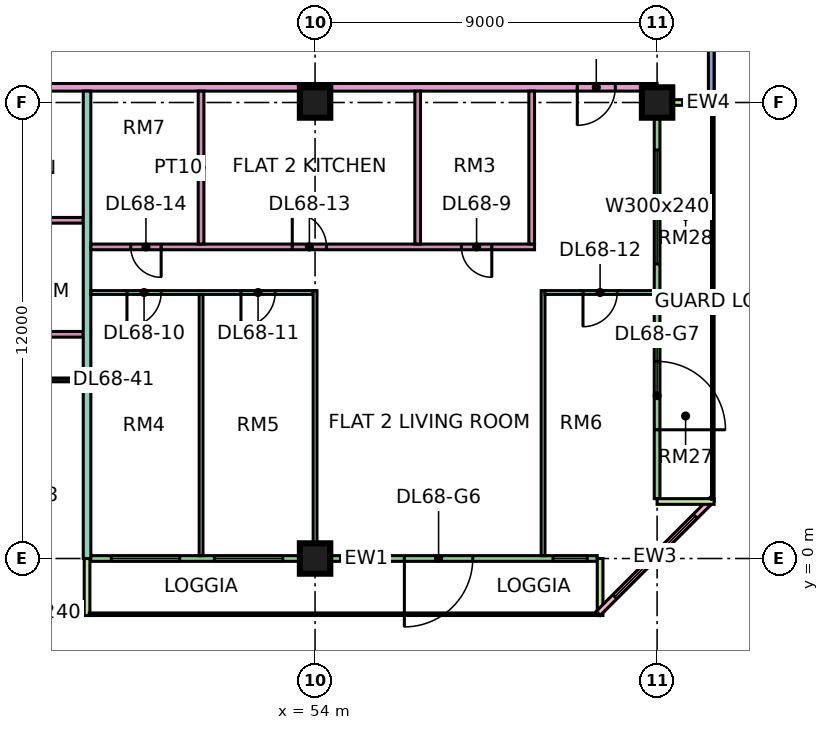
"""IFC4 building model, lengths in metres.
Left out: names, types, materials, properties, quantities, classifications, styles, units other than length and angle.
Written with IfcOpenShell. Run it as: python <this file> out.ifc"""

import sys

from ifc_helpers import new_model, si_unit, direction, frame, frame_2d, origin, origin_2d, place, context, subcontext, project, spatial, rectangle, extrude, element, fill, save


model = new_model("IFC4")
c1 = context("Model", 3, precision=1e-05, world=origin(), true_north=direction((0.0, 1.0)))
c2 = subcontext(c1, "Body", "Model", "MODEL_VIEW")
j1 = project(units=[si_unit("LENGTHUNIT", "METRE"), si_unit("PLANEANGLEUNIT", "RADIAN")], contexts=[c1])
p1 = place(None, origin())
s1 = spatial("IfcSite", under=j1, at=p1, CompositionType="ELEMENT")
p2 = place(p1, origin())
s2 = spatial("IfcBuilding", under=s1, at=p2, CompositionType="ELEMENT")
p3 = place(p2, frame((0.0, 0.0, 292.15)))
s3 = spatial("IfcBuildingStorey", under=s2, at=p3, CompositionType="ELEMENT", Elevation=292.15)
for number, where, z_axis, x_axis in (
    (1, (54.0, 0.0, 0.0), (0.0, 0.0, 1.0), (1.0, 0.0, 0.0)),
    (2, (54.0, 12.0, 0.0), (0.0, 0.0, 1.0), (1.0, 0.0, 0.0)),
    (3, (63.0, 12.0, 0.0), (0.0, 0.0, 1.0), (1.0, 0.0, 0.0)),
):
    element("IfcColumn", number, at=place(p3, frame(where, z_axis=z_axis, x_axis=x_axis)), inside=s3, PredefinedType="COLUMN", context=c2, shape_type="SweptSolid", body=[
        extrude(rectangle(XDim=0.8, YDim=0.8, at=origin_2d()), origin(), (0.0, 0.0, 1.0), 3.75),
    ])
p4 = place(p3, frame((36.075, -1.425, 0.0), z_axis=(0.0, 0.0, 1.0), x_axis=(1.0, 0.0, 0.0)))
e4 = element("IfcWall", 4, at=p4, inside=s3, PredefinedType="SOLIDWALL", context=c2, shape_type="SweptSolid", body=[
    extrude(rectangle(XDim=11.85, YDim=0.15, at=frame_2d((5.925, 0.0))), origin(), (0.0, 0.0, 1.0), 3.35),
])
p5 = place(p4, frame((1.462, 0.0, 0.45)))
e5 = element("IfcOpeningElement", 5, at=p5, cuts=e4, PredefinedType="OPENING", context=c2, shape_type="SweptSolid", body=[
    extrude(rectangle(XDim=3.0, YDim=2.4, at=frame_2d((1.5, 1.2))), frame((0.0, 0.085, 0.0), z_axis=(0.0, -1.0, 0.0), x_axis=(1.0, 0.0, 0.0)), (0.0, 0.0, 1.0), 0.17),
])
p6 = place(p4, frame((6.525, 0.0, 0.45)))
e6 = element("IfcOpeningElement", 6, at=p6, cuts=e4, PredefinedType="OPENING", context=c2, shape_type="SweptSolid", body=[
    extrude(rectangle(XDim=1.8, YDim=2.4, at=frame_2d((0.9, 1.2))), frame((0.0, 0.085, 0.0), z_axis=(0.0, -1.0, 0.0), x_axis=(1.0, 0.0, 0.0)), (0.0, 0.0, 1.0), 0.17),
])
p7 = place(p4, frame((9.488, 0.0, 0.45)))
e7 = element("IfcOpeningElement", 7, at=p7, cuts=e4, PredefinedType="OPENING", context=c2, shape_type="SweptSolid", body=[
    extrude(rectangle(XDim=1.8, YDim=2.4, at=frame_2d((0.9, 1.2))), frame((0.0, 0.085, 0.0), z_axis=(0.0, -1.0, 0.0), x_axis=(1.0, 0.0, 0.0)), (0.0, 0.0, 1.0), 0.17),
])
p8 = place(p3, frame((48.075, 0.0, 0.0), z_axis=(0.0, 0.0, 1.0), x_axis=(1.0, 0.0, 0.0)))
e8 = element("IfcWall", 8, at=p8, inside=s3, PredefinedType="SOLIDWALL", context=c2, shape_type="SweptSolid", body=[
    extrude(rectangle(XDim=13.35, YDim=0.15, at=frame_2d((6.675, 0.0))), origin(), (0.0, 0.0, 1.0), 3.35),
])
p9 = place(p8, frame((0.562, 0.0, 0.45)))
e9 = element("IfcOpeningElement", 9, at=p9, cuts=e8, PredefinedType="OPENING", context=c2, shape_type="SweptSolid", body=[
    extrude(rectangle(XDim=1.8, YDim=2.4, at=frame_2d((0.9, 1.2))), frame((0.0, 0.085, 0.0), z_axis=(0.0, -1.0, 0.0), x_axis=(1.0, 0.0, 0.0)), (0.0, 0.0, 1.0), 0.17),
])
p10 = place(p8, frame((3.275, 0.0, 0.45)))
e10 = element("IfcOpeningElement", 10, at=p10, cuts=e8, PredefinedType="OPENING", context=c2, shape_type="SweptSolid", body=[
    extrude(rectangle(XDim=1.8, YDim=2.4, at=frame_2d((0.9, 1.2))), frame((0.0, 0.085, 0.0), z_axis=(0.0, -1.0, 0.0), x_axis=(1.0, 0.0, 0.0)), (0.0, 0.0, 1.0), 0.17),
])
p11 = place(p8, frame((8.275, 0.0, 0.0)))
e11 = element("IfcOpeningElement", 11, at=p11, cuts=e8, PredefinedType="OPENING", context=c2, shape_type="SweptSolid", body=[
    extrude(rectangle(XDim=1.8, YDim=2.4, at=frame_2d((0.9, 1.2))), frame((0.0, 0.085, 0.0), z_axis=(0.0, -1.0, 0.0), x_axis=(1.0, 0.0, 0.0)), (0.0, 0.0, 1.0), 0.17),
])
p12 = place(p8, frame((12.188, 0.0, 0.45)))
e12 = element("IfcOpeningElement", 12, at=p12, cuts=e8, PredefinedType="OPENING", context=c2, shape_type="SweptSolid", body=[
    extrude(rectangle(XDim=0.9, YDim=2.4, at=frame_2d((0.45, 1.2))), frame((0.0, 0.085, 0.0), z_axis=(0.0, -1.0, 0.0), x_axis=(1.0, 0.0, 0.0)), (0.0, 0.0, 1.0), 0.17),
])
for number, where, z_axis, x_axis in (
    (13, (48.0, -1.5, 0.0), (0.0, 0.0, 1.0), (0.0, 1.0, 0.0)),
    (14, (61.5, -1.5, 0.0), (0.0, 0.0, 1.0), (0.0, 1.0, 0.0)),
):
    element("IfcWall", number, at=place(p3, frame(where, z_axis=z_axis, x_axis=x_axis)), inside=s3, PredefinedType="SOLIDWALL", context=c2, shape_type="SweptSolid", body=[
        extrude(rectangle(XDim=1.5, YDim=0.15, at=frame_2d((0.75, 0.0))), origin(), (0.0, 0.0, 1.0), 3.35),
    ])
p13 = place(p3, frame((61.447, -1.447, 0.0), z_axis=(0.0, 0.0, 1.0), x_axis=(0.707106781187, 0.707106781187, 0.0)))
e15 = element("IfcWall", 15, at=p13, inside=s3, PredefinedType="SOLIDWALL", context=c2, shape_type="SweptSolid", body=[
    extrude(rectangle(XDim=4.243, YDim=0.15, at=frame_2d((2.121, 0.0))), origin(), (0.0, 0.0, 1.0), 3.35),
])
p14 = place(p13, frame((0.621, 0.0, 0.45)))
e16 = element("IfcOpeningElement", 16, at=p14, cuts=e15, PredefinedType="OPENING", context=c2, shape_type="SweptSolid", body=[
    extrude(rectangle(XDim=3.0, YDim=2.4, at=frame_2d((1.5, 1.2))), frame((0.0, 0.085, 0.0), z_axis=(0.0, -1.0, 0.0), x_axis=(1.0, 0.0, 0.0)), (0.0, 0.0, 1.0), 0.17),
])
p15 = place(p3, frame((63.0, 1.575, 0.0), z_axis=(0.0, 0.0, 1.0), x_axis=(0.0, 1.0, 0.0)))
e17 = element("IfcWall", 17, at=p15, inside=s3, PredefinedType="SOLIDWALL", context=c2, shape_type="SweptSolid", body=[
    extrude(rectangle(XDim=10.35, YDim=0.15, at=frame_2d((5.175, 0.0))), origin(), (0.0, 0.0, 1.0), 3.35),
])
p16 = place(p15, frame((1.812, 0.0, 0.0)))
e18 = element("IfcOpeningElement", 18, at=p16, cuts=e17, PredefinedType="OPENING", context=c2, shape_type="SweptSolid", body=[
    extrude(rectangle(XDim=1.8, YDim=2.4, at=frame_2d((0.9, 1.2))), frame((0.0, 0.085, 0.0), z_axis=(0.0, -1.0, 0.0), x_axis=(1.0, 0.0, 0.0)), (0.0, 0.0, 1.0), 0.17),
])
p17 = place(p15, frame((6.175, 0.0, 0.45)))
e19 = element("IfcOpeningElement", 19, at=p17, cuts=e17, PredefinedType="OPENING", context=c2, shape_type="SweptSolid", body=[
    extrude(rectangle(XDim=3.0, YDim=2.4, at=frame_2d((1.5, 1.2))), frame((0.0, 0.085, 0.0), z_axis=(0.0, -1.0, 0.0), x_axis=(1.0, 0.0, 0.0)), (0.0, 0.0, 1.0), 0.17),
])
for number, where, z_axis, x_axis in (
    (20, (64.5, 1.5, 0.0), (0.0, 0.0, 1.0), (-1.0, 0.0, 0.0)),
    (21, (64.5, 12.0, 0.0), (0.0, 0.0, 1.0), (-1.0, 0.0, 0.0)),
):
    element("IfcWall", number, at=place(p3, frame(where, z_axis=z_axis, x_axis=x_axis)), inside=s3, PredefinedType="SOLIDWALL", context=c2, shape_type="SweptSolid", body=[
        extrude(rectangle(XDim=1.5, YDim=0.15, at=frame_2d((0.75, 0.0))), origin(), (0.0, 0.0, 1.0), 3.35),
    ])
p18 = place(p3, frame((64.425, 12.075, 0.0), z_axis=(0.0, 0.0, 1.0), x_axis=(0.0, 1.0, 0.0)))
e22 = element("IfcWall", 22, at=p18, inside=s3, PredefinedType="SOLIDWALL", context=c2, shape_type="SweptSolid", body=[
    extrude(rectangle(XDim=10.425, YDim=0.15, at=frame_2d((5.212, 0.0))), origin(), (0.0, 0.0, 1.0), 3.35),
])
p19 = place(p18, frame((4.125, 0.0, 0.45)))
e23 = element("IfcOpeningElement", 23, at=p19, cuts=e22, PredefinedType="OPENING", context=c2, shape_type="SweptSolid", body=[
    extrude(rectangle(XDim=3.0, YDim=2.4, at=frame_2d((1.5, 1.2))), frame((0.0, 0.085, 0.0), z_axis=(0.0, -1.0, 0.0), x_axis=(1.0, 0.0, 0.0)), (0.0, 0.0, 1.0), 0.17),
])
p20 = place(p18, frame((8.175, 0.0, 0.45)))
e24 = element("IfcOpeningElement", 24, at=p20, cuts=e22, PredefinedType="OPENING", context=c2, shape_type="SweptSolid", body=[
    extrude(rectangle(XDim=1.8, YDim=2.4, at=frame_2d((0.9, 1.2))), frame((0.0, 0.085, 0.0), z_axis=(0.0, -1.0, 0.0), x_axis=(1.0, 0.0, 0.0)), (0.0, 0.0, 1.0), 0.17),
])
p21 = place(p3, frame((33.05, 4.7, 0.0), z_axis=(0.0, 0.0, 1.0), x_axis=(1.0, 0.0, 0.0)))
e25 = element("IfcWall", 25, at=p21, inside=s3, PredefinedType="PARTITIONING", context=c2, shape_type="SweptSolid", body=[
    extrude(rectangle(XDim=14.85, YDim=0.1, at=frame_2d((7.425, 0.0))), origin(), (0.0, 0.0, 1.0), 3.35),
])
p22 = place(p21, frame((10.0, 0.0, 0.0)))
e26 = element("IfcOpeningElement", 26, at=p22, cuts=e25, PredefinedType="OPENING", context=c2, shape_type="SweptSolid", body=[
    extrude(rectangle(XDim=0.9, YDim=2.1, at=frame_2d((0.45, 1.05))), frame((0.0, 0.06, 0.0), z_axis=(0.0, -1.0, 0.0), x_axis=(1.0, 0.0, 0.0)), (0.0, 0.0, 1.0), 0.12),
])
p23 = place(p21, frame((13.0, 0.0, 0.0)))
e27 = element("IfcOpeningElement", 27, at=p23, cuts=e25, PredefinedType="OPENING", context=c2, shape_type="SweptSolid", body=[
    extrude(rectangle(XDim=0.9, YDim=2.1, at=frame_2d((0.45, 1.05))), frame((0.0, 0.06, 0.0), z_axis=(0.0, -1.0, 0.0), x_axis=(1.0, 0.0, 0.0)), (0.0, 0.0, 1.0), 0.12),
])
p24 = place(p21, frame((4.0, 0.0, 0.0)))
e28 = element("IfcOpeningElement", 28, at=p24, cuts=e25, PredefinedType="OPENING", context=c2, shape_type="SweptSolid", body=[
    extrude(rectangle(XDim=0.9, YDim=2.1, at=frame_2d((0.45, 1.05))), frame((0.0, 0.06, 0.0), z_axis=(0.0, -1.0, 0.0), x_axis=(1.0, 0.0, 0.0)), (0.0, 0.0, 1.0), 0.12),
])
p25 = place(p3, frame((40.65, 12.4, 0.0), z_axis=(0.0, 0.0, 1.0), x_axis=(1.0, 0.0, 0.0)))
e29 = element("IfcWall", 29, at=p25, inside=s3, PredefinedType="PARTITIONING", context=c2, shape_type="SweptSolid", body=[
    extrude(rectangle(XDim=22.35, YDim=0.2, at=frame_2d((11.175, 0.0))), origin(), (0.0, 0.0, 1.0), 3.35),
])
p26 = place(p25, frame((20.25, 0.0, 0.0)))
e30 = element("IfcOpeningElement", 30, at=p26, cuts=e29, PredefinedType="OPENING", context=c2, shape_type="SweptSolid", body=[
    extrude(rectangle(XDim=1.0, YDim=2.1, at=frame_2d((0.5, 1.05))), frame((0.0, 0.11, 0.0), z_axis=(0.0, -1.0, 0.0), x_axis=(1.0, 0.0, 0.0)), (0.0, 0.0, 1.0), 0.22),
])
p27 = place(p25, frame((1.05, 0.0, 0.0)))
e31 = element("IfcOpeningElement", 31, at=p27, cuts=e29, PredefinedType="OPENING", context=c2, shape_type="SweptSolid", body=[
    extrude(rectangle(XDim=1.0, YDim=2.1, at=frame_2d((0.5, 1.05))), frame((0.0, 0.11, 0.0), z_axis=(0.0, -1.0, 0.0), x_axis=(1.0, 0.0, 0.0)), (0.0, 0.0, 1.0), 0.22),
])
p28 = place(p3, frame((43.725, 5.9, 0.0), z_axis=(0.0, 0.0, 1.0), x_axis=(1.0, 0.0, 0.0)))
e32 = element("IfcWall", 32, at=p28, inside=s3, PredefinedType="PARTITIONING", context=c2, shape_type="SweptSolid", body=[
    extrude(rectangle(XDim=4.175, YDim=0.15, at=frame_2d((2.087, 0.0))), origin(), (0.0, 0.0, 1.0), 3.35),
])
p29 = place(p28, frame((1.675, 0.0, 0.0)))
e33 = element("IfcOpeningElement", 33, at=p29, cuts=e32, PredefinedType="OPENING", context=c2, shape_type="SweptSolid", body=[
    extrude(rectangle(XDim=0.8, YDim=2.1, at=frame_2d((0.4, 1.05))), frame((0.0, 0.085, 0.0), z_axis=(0.0, -1.0, 0.0), x_axis=(1.0, 0.0, 0.0)), (0.0, 0.0, 1.0), 0.17),
])
p30 = place(p3, frame((43.725, 8.9, 0.0), z_axis=(0.0, 0.0, 1.0), x_axis=(1.0, 0.0, 0.0)))
e34 = element("IfcWall", 34, at=p30, inside=s3, PredefinedType="PARTITIONING", context=c2, shape_type="SweptSolid", body=[
    extrude(rectangle(XDim=4.175, YDim=0.15, at=frame_2d((2.087, 0.0))), origin(), (0.0, 0.0, 1.0), 3.35),
])
p31 = place(p3, frame((48.0, 0.0, 0.0), z_axis=(0.0, 0.0, 1.0), x_axis=(0.0, 1.0, 0.0)))
e35 = element("IfcWall", 35, at=p31, inside=s3, PredefinedType="PARTITIONING", context=c2, shape_type="SweptSolid", body=[
    extrude(rectangle(XDim=12.3, YDim=0.2, at=frame_2d((6.15, 0.0))), origin(), (0.0, 0.0, 1.0), 3.35),
])
p32 = place(p3, frame((48.1, 7.0, 0.0), z_axis=(0.0, 0.0, 1.0), x_axis=(1.0, 0.0, 0.0)))
e36 = element("IfcWall", 36, at=p32, inside=s3, PredefinedType="PARTITIONING", context=c2, shape_type="SweptSolid", body=[
    extrude(rectangle(XDim=5.85, YDim=0.1, at=frame_2d((2.925, 0.0))), origin(), (0.0, 0.0, 1.0), 3.35),
])
p33 = place(p32, frame((0.95, 0.0, 0.0)))
e37 = element("IfcOpeningElement", 37, at=p33, cuts=e36, PredefinedType="OPENING", context=c2, shape_type="SweptSolid", body=[
    extrude(rectangle(XDim=0.9, YDim=2.1, at=frame_2d((0.45, 1.05))), frame((0.0, 0.06, 0.0), z_axis=(0.0, -1.0, 0.0), x_axis=(1.0, 0.0, 0.0)), (0.0, 0.0, 1.0), 0.12),
])
p34 = place(p32, frame((3.95, 0.0, 0.0)))
e38 = element("IfcOpeningElement", 38, at=p34, cuts=e36, PredefinedType="OPENING", context=c2, shape_type="SweptSolid", body=[
    extrude(rectangle(XDim=0.9, YDim=2.1, at=frame_2d((0.45, 1.05))), frame((0.0, 0.06, 0.0), z_axis=(0.0, -1.0, 0.0), x_axis=(1.0, 0.0, 0.0)), (0.0, 0.0, 1.0), 0.12),
])
p35 = place(p3, frame((48.1, 8.2, 0.0), z_axis=(0.0, 0.0, 1.0), x_axis=(1.0, 0.0, 0.0)))
e39 = element("IfcWall", 39, at=p35, inside=s3, PredefinedType="PARTITIONING", context=c2, shape_type="SweptSolid", body=[
    extrude(rectangle(XDim=11.675, YDim=0.15, at=frame_2d((5.837, 0.0))), origin(), (0.0, 0.0, 1.0), 3.35),
])
p36 = place(p35, frame((9.75, 0.0, 0.0)))
e40 = element("IfcOpeningElement", 40, at=p36, cuts=e39, PredefinedType="OPENING", context=c2, shape_type="SweptSolid", body=[
    extrude(rectangle(XDim=0.8, YDim=2.1, at=frame_2d((0.4, 1.05))), frame((0.0, 0.085, 0.0), z_axis=(0.0, -1.0, 0.0), x_axis=(1.0, 0.0, 0.0)), (0.0, 0.0, 1.0), 0.17),
])
p37 = place(p35, frame((5.3, 0.0, 0.0)))
e41 = element("IfcOpeningElement", 41, at=p37, cuts=e39, PredefinedType="OPENING", context=c2, shape_type="SweptSolid", body=[
    extrude(rectangle(XDim=0.9, YDim=2.1, at=frame_2d((0.45, 1.05))), frame((0.0, 0.085, 0.0), z_axis=(0.0, -1.0, 0.0), x_axis=(1.0, 0.0, 0.0)), (0.0, 0.0, 1.0), 0.17),
])
p38 = place(p35, frame((1.05, 0.0, 0.0)))
e42 = element("IfcOpeningElement", 42, at=p38, cuts=e39, PredefinedType="OPENING", context=c2, shape_type="SweptSolid", body=[
    extrude(rectangle(XDim=0.8, YDim=2.1, at=frame_2d((0.4, 1.05))), frame((0.0, 0.085, 0.0), z_axis=(0.0, -1.0, 0.0), x_axis=(1.0, 0.0, 0.0)), (0.0, 0.0, 1.0), 0.17),
])
p39 = place(p3, frame((51.0, 0.074, 0.0), z_axis=(0.0, 0.0, 1.0), x_axis=(0.0, 1.0, 0.0)))
e43 = element("IfcWall", 43, at=p39, inside=s3, PredefinedType="PARTITIONING", context=c2, shape_type="SweptSolid", body=[
    extrude(rectangle(XDim=6.876, YDim=0.1, at=frame_2d((3.438, 0.0))), origin(), (0.0, 0.0, 1.0), 3.35),
])
p40 = place(p3, frame((51.0, 8.275, 0.0), z_axis=(0.0, 0.0, 1.0), x_axis=(0.0, 1.0, 0.0)))
e44 = element("IfcWall", 44, at=p40, inside=s3, PredefinedType="PARTITIONING", context=c2, shape_type="SweptSolid", body=[
    extrude(rectangle(XDim=4.025, YDim=0.15, at=frame_2d((2.013, 0.0))), origin(), (0.0, 0.0, 1.0), 3.35),
])
p41 = place(p3, frame((54.0, 0.074, 0.0), z_axis=(0.0, 0.0, 1.0), x_axis=(0.0, 1.0, 0.0)))
e45 = element("IfcWall", 45, at=p41, inside=s3, PredefinedType="PARTITIONING", context=c2, shape_type="SweptSolid", body=[
    extrude(rectangle(XDim=6.976, YDim=0.1, at=frame_2d((3.488, 0.0))), origin(), (0.0, 0.0, 1.0), 3.35),
])
for number, where, z_axis, x_axis in (
    (46, (56.7, 8.275, 0.0), (0.0, 0.0, 1.0), (0.0, 1.0, 0.0)),
    (47, (59.7, 8.275, 0.0), (0.0, 0.0, 1.0), (0.0, 1.0, 0.0)),
):
    element("IfcWall", number, at=place(p3, frame(where, z_axis=z_axis, x_axis=x_axis)), inside=s3, PredefinedType="PARTITIONING", context=c2, shape_type="SweptSolid", body=[
        extrude(rectangle(XDim=4.025, YDim=0.15, at=frame_2d((2.013, 0.0))), origin(), (0.0, 0.0, 1.0), 3.35),
    ])
p42 = place(p3, frame((60.0, 0.074, 0.0), z_axis=(0.0, 0.0, 1.0), x_axis=(0.0, 1.0, 0.0)))
e48 = element("IfcWall", 48, at=p42, inside=s3, PredefinedType="PARTITIONING", context=c2, shape_type="SweptSolid", body=[
    extrude(rectangle(XDim=6.976, YDim=0.1, at=frame_2d((3.488, 0.0))), origin(), (0.0, 0.0, 1.0), 3.35),
])
p43 = place(p3, frame((60.05, 7.0, 0.0), z_axis=(0.0, 0.0, 1.0), x_axis=(1.0, 0.0, 0.0)))
e49 = element("IfcWall", 49, at=p43, inside=s3, PredefinedType="PARTITIONING", context=c2, shape_type="SweptSolid", body=[
    extrude(rectangle(XDim=2.876, YDim=0.1, at=frame_2d((1.438, 0.0))), origin(), (0.0, 0.0, 1.0), 3.35),
])
p44 = place(p43, frame((1.0, 0.0, 0.0)))
e50 = element("IfcOpeningElement", 50, at=p44, cuts=e49, PredefinedType="OPENING", context=c2, shape_type="SweptSolid", body=[
    extrude(rectangle(XDim=0.9, YDim=2.1, at=frame_2d((0.45, 1.05))), frame((0.0, 0.06, 0.0), z_axis=(0.0, -1.0, 0.0), x_axis=(1.0, 0.0, 0.0)), (0.0, 0.0, 1.0), 0.12),
])
p45 = place(p7, origin())
e51 = element("IfcWindow", 51, at=p45, inside=s3, PartitioningType="SINGLE_PANEL", PredefinedType="WINDOW", context=c2, shape_type="SweptSolid", body=[
    extrude(rectangle(XDim=1.8, YDim=2.4, at=frame_2d((0.9, 1.2))), frame((0.0, 0.03, 0.0), z_axis=(0.0, -1.0, 0.0), x_axis=(1.0, 0.0, 0.0)), (0.0, 0.0, 1.0), 0.06),
])
fill(e7, e51)
p46 = place(p9, origin())
e52 = element("IfcWindow", 52, at=p46, inside=s3, PartitioningType="SINGLE_PANEL", PredefinedType="WINDOW", context=c2, shape_type="SweptSolid", body=[
    extrude(rectangle(XDim=1.8, YDim=2.4, at=frame_2d((0.9, 1.2))), frame((0.0, 0.03, 0.0), z_axis=(0.0, -1.0, 0.0), x_axis=(1.0, 0.0, 0.0)), (0.0, 0.0, 1.0), 0.06),
])
fill(e9, e52)
p47 = place(p10, origin())
e53 = element("IfcWindow", 53, at=p47, inside=s3, PartitioningType="SINGLE_PANEL", PredefinedType="WINDOW", context=c2, shape_type="SweptSolid", body=[
    extrude(rectangle(XDim=1.8, YDim=2.4, at=frame_2d((0.9, 1.2))), frame((0.0, 0.03, 0.0), z_axis=(0.0, -1.0, 0.0), x_axis=(1.0, 0.0, 0.0)), (0.0, 0.0, 1.0), 0.06),
])
fill(e10, e53)
p48 = place(p11, frame((1.8, 0.0, 0.0), z_axis=(0.0, 0.0, 1.0), x_axis=(-1.0, 0.0, 0.0)))
e54 = element("IfcDoor", 54, at=p48, inside=s3, OperationType="DOUBLE_DOOR_SINGLE_SWING", PredefinedType="DOOR", context=c2, shape_type="SweptSolid", body=[
    extrude(rectangle(XDim=1.8, YDim=2.4, at=frame_2d((0.9, 1.2))), frame((0.0, 0.025, 0.0), z_axis=(0.0, -1.0, 0.0), x_axis=(1.0, 0.0, 0.0)), (0.0, 0.0, 1.0), 0.05),
])
fill(e11, e54)
p49 = place(p12, origin())
e55 = element("IfcWindow", 55, at=p49, inside=s3, PartitioningType="SINGLE_PANEL", PredefinedType="WINDOW", context=c2, shape_type="SweptSolid", body=[
    extrude(rectangle(XDim=0.9, YDim=2.4, at=frame_2d((0.45, 1.2))), frame((0.0, 0.03, 0.0), z_axis=(0.0, -1.0, 0.0), x_axis=(1.0, 0.0, 0.0)), (0.0, 0.0, 1.0), 0.06),
])
fill(e12, e55)
p50 = place(p14, origin())
e56 = element("IfcWindow", 56, at=p50, inside=s3, PartitioningType="SINGLE_PANEL", PredefinedType="WINDOW", context=c2, shape_type="SweptSolid", body=[
    extrude(rectangle(XDim=3.0, YDim=2.4, at=frame_2d((1.5, 1.2))), frame((0.0, 0.03, 0.0), z_axis=(0.0, -1.0, 0.0), x_axis=(1.0, 0.0, 0.0)), (0.0, 0.0, 1.0), 0.06),
])
fill(e16, e56)
p51 = place(p16, frame((1.8, 0.0, 0.0), z_axis=(0.0, 0.0, 1.0), x_axis=(-1.0, 0.0, 0.0)))
e57 = element("IfcDoor", 57, at=p51, inside=s3, OperationType="DOUBLE_DOOR_SINGLE_SWING", PredefinedType="DOOR", context=c2, shape_type="SweptSolid", body=[
    extrude(rectangle(XDim=1.8, YDim=2.4, at=frame_2d((0.9, 1.2))), frame((0.0, 0.025, 0.0), z_axis=(0.0, -1.0, 0.0), x_axis=(1.0, 0.0, 0.0)), (0.0, 0.0, 1.0), 0.05),
])
fill(e18, e57)
p52 = place(p17, origin())
e58 = element("IfcWindow", 58, at=p52, inside=s3, PartitioningType="SINGLE_PANEL", PredefinedType="WINDOW", context=c2, shape_type="SweptSolid", body=[
    extrude(rectangle(XDim=3.0, YDim=2.4, at=frame_2d((1.5, 1.2))), frame((0.0, 0.03, 0.0), z_axis=(0.0, -1.0, 0.0), x_axis=(1.0, 0.0, 0.0)), (0.0, 0.0, 1.0), 0.06),
])
fill(e19, e58)
p53 = place(p36, origin())
e59 = element("IfcDoor", 59, at=p53, inside=s3, OperationType="SINGLE_SWING_RIGHT", PredefinedType="DOOR", context=c2, shape_type="SweptSolid", body=[
    extrude(rectangle(XDim=0.8, YDim=2.1, at=frame_2d((0.4, 1.05))), frame((0.0, 0.025, 0.0), z_axis=(0.0, -1.0, 0.0), x_axis=(1.0, 0.0, 0.0)), (0.0, 0.0, 1.0), 0.05),
])
fill(e40, e59)
p54 = place(p33, frame((0.9, 0.0, 0.0), z_axis=(0.0, 0.0, 1.0), x_axis=(-1.0, 0.0, 0.0)))
e60 = element("IfcDoor", 60, at=p54, inside=s3, OperationType="SINGLE_SWING_LEFT", PredefinedType="DOOR", context=c2, shape_type="SweptSolid", body=[
    extrude(rectangle(XDim=0.9, YDim=2.1, at=frame_2d((0.45, 1.05))), frame((0.0, 0.025, 0.0), z_axis=(0.0, -1.0, 0.0), x_axis=(1.0, 0.0, 0.0)), (0.0, 0.0, 1.0), 0.05),
])
fill(e37, e60)
p55 = place(p34, frame((0.9, 0.0, 0.0), z_axis=(0.0, 0.0, 1.0), x_axis=(-1.0, 0.0, 0.0)))
e61 = element("IfcDoor", 61, at=p55, inside=s3, OperationType="SINGLE_SWING_LEFT", PredefinedType="DOOR", context=c2, shape_type="SweptSolid", body=[
    extrude(rectangle(XDim=0.9, YDim=2.1, at=frame_2d((0.45, 1.05))), frame((0.0, 0.025, 0.0), z_axis=(0.0, -1.0, 0.0), x_axis=(1.0, 0.0, 0.0)), (0.0, 0.0, 1.0), 0.05),
])
fill(e38, e61)
p56 = place(p44, frame((0.9, 0.0, 0.0), z_axis=(0.0, 0.0, 1.0), x_axis=(-1.0, 0.0, 0.0)))
e62 = element("IfcDoor", 62, at=p56, inside=s3, OperationType="SINGLE_SWING_LEFT", PredefinedType="DOOR", context=c2, shape_type="SweptSolid", body=[
    extrude(rectangle(XDim=0.9, YDim=2.1, at=frame_2d((0.45, 1.05))), frame((0.0, 0.025, 0.0), z_axis=(0.0, -1.0, 0.0), x_axis=(1.0, 0.0, 0.0)), (0.0, 0.0, 1.0), 0.05),
])
fill(e50, e62)
p57 = place(p37, origin())
e63 = element("IfcDoor", 63, at=p57, inside=s3, OperationType="SINGLE_SWING_LEFT", PredefinedType="DOOR", context=c2, shape_type="SweptSolid", body=[
    extrude(rectangle(XDim=0.9, YDim=2.1, at=frame_2d((0.45, 1.05))), frame((0.0, 0.025, 0.0), z_axis=(0.0, -1.0, 0.0), x_axis=(1.0, 0.0, 0.0)), (0.0, 0.0, 1.0), 0.05),
])
fill(e41, e63)
p58 = place(p38, origin())
e64 = element("IfcDoor", 64, at=p58, inside=s3, OperationType="SINGLE_SWING_RIGHT", PredefinedType="DOOR", context=c2, shape_type="SweptSolid", body=[
    extrude(rectangle(XDim=0.8, YDim=2.1, at=frame_2d((0.4, 1.05))), frame((0.0, 0.025, 0.0), z_axis=(0.0, -1.0, 0.0), x_axis=(1.0, 0.0, 0.0)), (0.0, 0.0, 1.0), 0.05),
])
fill(e42, e64)
p59 = place(p26, frame((1.0, 0.0, 0.0), z_axis=(0.0, 0.0, 1.0), x_axis=(-1.0, 0.0, 0.0)))
e65 = element("IfcDoor", 65, at=p59, inside=s3, OperationType="SINGLE_SWING_LEFT", PredefinedType="DOOR", context=c2, shape_type="SweptSolid", body=[
    extrude(rectangle(XDim=1.0, YDim=2.1, at=frame_2d((0.5, 1.05))), frame((0.0, 0.025, 0.0), z_axis=(0.0, -1.0, 0.0), x_axis=(1.0, 0.0, 0.0)), (0.0, 0.0, 1.0), 0.05),
])
fill(e30, e65)
save(model, sys.argv[1])
